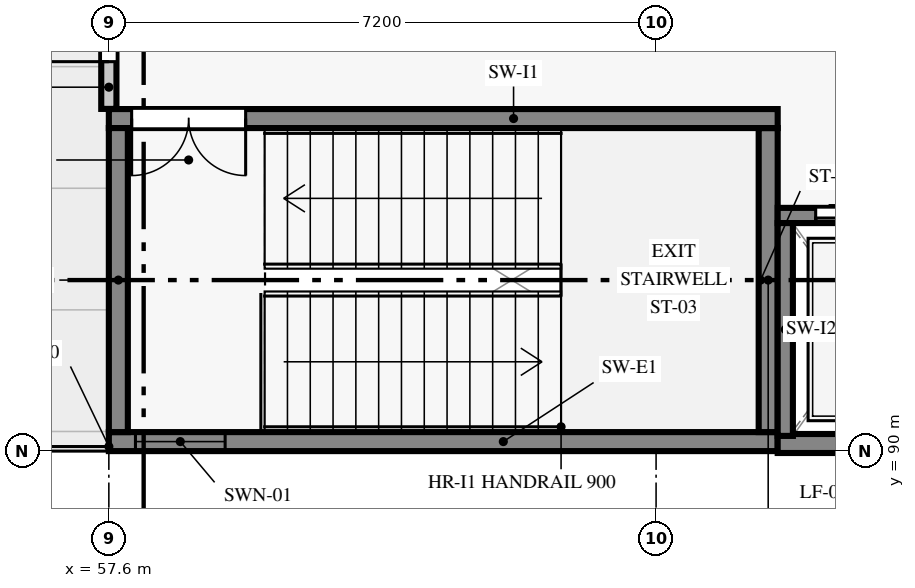
"""IFC4 building model, lengths in metres.
Left out: names, types, materials, properties, quantities, classifications, styles, units other than length and angle.
Written with IfcOpenShell. Run it as: python <this file> out.ifc"""

import sys

from ifc_helpers import new_model, si_unit, direction, frame, frame_2d, origin, place, context, subcontext, project, spatial, rectangle, extrude, element, fill, save


model = new_model("IFC4")
c1 = context("Model", 3, precision=1e-05, world=origin(), true_north=direction((0.0, 1.0)))
c2 = subcontext(c1, "Body", "Model", "MODEL_VIEW")
j1 = project(units=[si_unit("LENGTHUNIT", "METRE"), si_unit("PLANEANGLEUNIT", "RADIAN")], contexts=[c1])
p1 = place(None, origin())
s1 = spatial("IfcSite", under=j1, at=p1, CompositionType="ELEMENT")
p2 = place(p1, origin())
s2 = spatial("IfcBuilding", under=s1, at=p2, CompositionType="ELEMENT")
p3 = place(p2, frame((0.0, 0.0, 22.2)))
s3 = spatial("IfcBuildingStorey", under=s2, at=p3, CompositionType="ELEMENT", Elevation=22.2)
p4 = place(p3, frame((57.6, 96.905, 0.0), z_axis=(0.0, 0.0, 1.0), x_axis=(0.0, -1.0, 0.0)))
e1 = element("IfcWall", 1, at=p4, inside=s3, PredefinedType="STANDARD", context=c2, shape_type="SweptSolid", body=[
    extrude(rectangle(XDim=2.403, YDim=0.2, at=frame_2d((1.202, 0.0))), origin(), (0.0, 0.0, 1.0), 3.975),
])
p5 = place(p4, frame((0.622, 0.0, 0.0)))
e2 = element("IfcOpeningElement", 2, at=p5, cuts=e1, PredefinedType="OPENING", context=c2, shape_type="SweptSolid", body=[
    extrude(rectangle(XDim=1.16, YDim=2.14, at=frame_2d((0.58, 1.07))), frame((0.0, 0.11, 0.0), z_axis=(0.0, -1.0, 0.0), x_axis=(1.0, 0.0, 0.0)), (0.0, 0.0, 1.0), 0.22),
])
p6 = place(p3, frame((57.6, 90.125, 0.0), z_axis=(0.0, 0.0, 1.0), x_axis=(1.0, 0.0, 0.0)))
e3 = element("IfcWall", 3, at=p6, inside=s3, PredefinedType="SHEAR", context=c2, shape_type="SweptSolid", body=[
    extrude(rectangle(XDim=8.8, YDim=0.25, at=frame_2d((4.4, 0.0))), origin(), (0.0, 0.0, 1.0), 3.975),
])
p7 = place(p6, frame((0.35, 0.0, 0.92)))
e4 = element("IfcOpeningElement", 4, at=p7, cuts=e3, PredefinedType="OPENING", context=c2, shape_type="SweptSolid", body=[
    extrude(rectangle(XDim=1.18, YDim=1.48, at=frame_2d((0.59, 0.74))), frame((0.0, 0.135, 0.0), z_axis=(0.0, -1.0, 0.0), x_axis=(1.0, 0.0, 0.0)), (0.0, 0.0, 1.0), 0.27),
])
p8 = place(p3, frame((66.275, 90.25, 0.0), z_axis=(0.0, 0.0, 1.0), x_axis=(0.0, 1.0, 0.0)))
e5 = element("IfcWall", 5, at=p8, inside=s3, PredefinedType="SHEAR", context=c2, shape_type="SweptSolid", body=[
    extrude(rectangle(XDim=4.0, YDim=0.25, at=frame_2d((2.0, 0.0))), origin(), (0.0, 0.0, 1.0), 3.975),
])
p9 = place(p3, frame((66.4, 94.375, 0.0), z_axis=(0.0, 0.0, 1.0), x_axis=(-1.0, 0.0, 0.0)))
e6 = element("IfcWall", 6, at=p9, inside=s3, PredefinedType="SHEAR", context=c2, shape_type="SweptSolid", body=[
    extrude(rectangle(XDim=8.8, YDim=0.25, at=frame_2d((4.4, 0.0))), origin(), (0.0, 0.0, 1.0), 3.975),
])
p10 = place(p9, frame((7.0, 0.0, 0.0)))
e7 = element("IfcOpeningElement", 7, at=p10, cuts=e6, PredefinedType="OPENING", context=c2, shape_type="SweptSolid", body=[
    extrude(rectangle(XDim=1.5, YDim=2.15, at=frame_2d((0.75, 1.075))), frame((0.0, 0.135, 0.0), z_axis=(0.0, -1.0, 0.0), x_axis=(1.0, 0.0, 0.0)), (0.0, 0.0, 1.0), 0.27),
])
p11 = place(p3, frame((57.725, 94.25, 0.0), z_axis=(0.0, 0.0, 1.0), x_axis=(0.0, -1.0, 0.0)))
e8 = element("IfcWall", 8, at=p11, inside=s3, PredefinedType="SHEAR", context=c2, shape_type="SweptSolid", body=[
    extrude(rectangle(XDim=4.0, YDim=0.25, at=frame_2d((2.0, 0.0))), origin(), (0.0, 0.0, 1.0), 3.975),
])
p12 = place(p3, frame((66.4, 90.1, 0.0), z_axis=(0.0, 0.0, 1.0), x_axis=(1.0, 0.0, 0.0)))
e9 = element("IfcWall", 9, at=p12, inside=s3, PredefinedType="SHEAR", context=c2, shape_type="SweptSolid", body=[
    extrude(rectangle(XDim=2.4, YDim=0.25, at=frame_2d((1.2, 0.0))), origin(), (0.0, 0.0, 1.0), 3.975),
])
p13 = place(p3, frame((68.8, 93.1, 0.0), z_axis=(0.0, 0.0, 1.0), x_axis=(-1.0, 0.0, 0.0)))
e10 = element("IfcWall", 10, at=p13, inside=s3, PredefinedType="SHEAR", context=c2, shape_type="SweptSolid", body=[
    extrude(rectangle(XDim=2.4, YDim=0.2, at=frame_2d((1.2, 0.0))), origin(), (0.0, 0.0, 1.0), 3.975),
])
p14 = place(p13, frame((0.5, 0.0, 0.0)))
e11 = element("IfcOpeningElement", 11, at=p14, cuts=e10, PredefinedType="OPENING", context=c2, shape_type="SweptSolid", body=[
    extrude(rectangle(XDim=1.4, YDim=2.15, at=frame_2d((0.7, 1.075))), frame((0.0, 0.11, 0.0), z_axis=(0.0, -1.0, 0.0), x_axis=(1.0, 0.0, 0.0)), (0.0, 0.0, 1.0), 0.22),
])
p15 = place(p3, frame((66.5, 93.0, 0.0), z_axis=(0.0, 0.0, 1.0), x_axis=(0.0, -1.0, 0.0)))
e12 = element("IfcWall", 12, at=p15, inside=s3, PredefinedType="SHEAR", context=c2, shape_type="SweptSolid", body=[
    extrude(rectangle(XDim=2.8, YDim=0.2, at=frame_2d((1.4, 0.0))), origin(), (0.0, 0.0, 1.0), 3.975),
])
p16 = place(p5, frame((1.16, 0.0, 0.0), z_axis=(0.0, 0.0, 1.0), x_axis=(-1.0, 0.0, 0.0)))
e13 = element("IfcDoor", 13, at=p16, inside=s3, OperationType="SINGLE_SWING_LEFT", PredefinedType="DOOR", context=c2, shape_type="SweptSolid", body=[
    extrude(rectangle(XDim=1.16, YDim=2.14, at=frame_2d((0.58, 1.07))), frame((0.0, 0.025, 0.0), z_axis=(0.0, -1.0, 0.0), x_axis=(1.0, 0.0, 0.0)), (0.0, 0.0, 1.0), 0.05),
])
fill(e2, e13)
p17 = place(p7, origin())
e14 = element("IfcWindow", 14, at=p17, inside=s3, PartitioningType="SINGLE_PANEL", PredefinedType="WINDOW", context=c2, shape_type="SweptSolid", body=[
    extrude(rectangle(XDim=1.18, YDim=1.48, at=frame_2d((0.59, 0.74))), frame((0.0, 0.03, 0.0), z_axis=(0.0, -1.0, 0.0), x_axis=(1.0, 0.0, 0.0)), (0.0, 0.0, 1.0), 0.06),
])
fill(e4, e14)
p18 = place(p10, origin())
e15 = element("IfcDoor", 15, at=p18, inside=s3, OperationType="DOUBLE_DOOR_SINGLE_SWING", PredefinedType="DOOR", context=c2, shape_type="SweptSolid", body=[
    extrude(rectangle(XDim=1.5, YDim=2.15, at=frame_2d((0.75, 1.075))), frame((0.0, 0.025, 0.0), z_axis=(0.0, -1.0, 0.0), x_axis=(1.0, 0.0, 0.0)), (0.0, 0.0, 1.0), 0.05),
])
fill(e7, e15)
p19 = place(p14, frame((1.4, 0.0, 0.0), z_axis=(0.0, 0.0, 1.0), x_axis=(-1.0, 0.0, 0.0)))
e16 = element("IfcDoor", 16, at=p19, inside=s3, OperationType="DOUBLE_DOOR_SLIDING", PredefinedType="DOOR", context=c2, shape_type="SweptSolid", body=[
    extrude(rectangle(XDim=1.4, YDim=2.15, at=frame_2d((0.7, 1.075))), frame((0.0, 0.025, 0.0), z_axis=(0.0, -1.0, 0.0), x_axis=(1.0, 0.0, 0.0)), (0.0, 0.0, 1.0), 0.05),
])
fill(e11, e16)
save(model, sys.argv[1])
